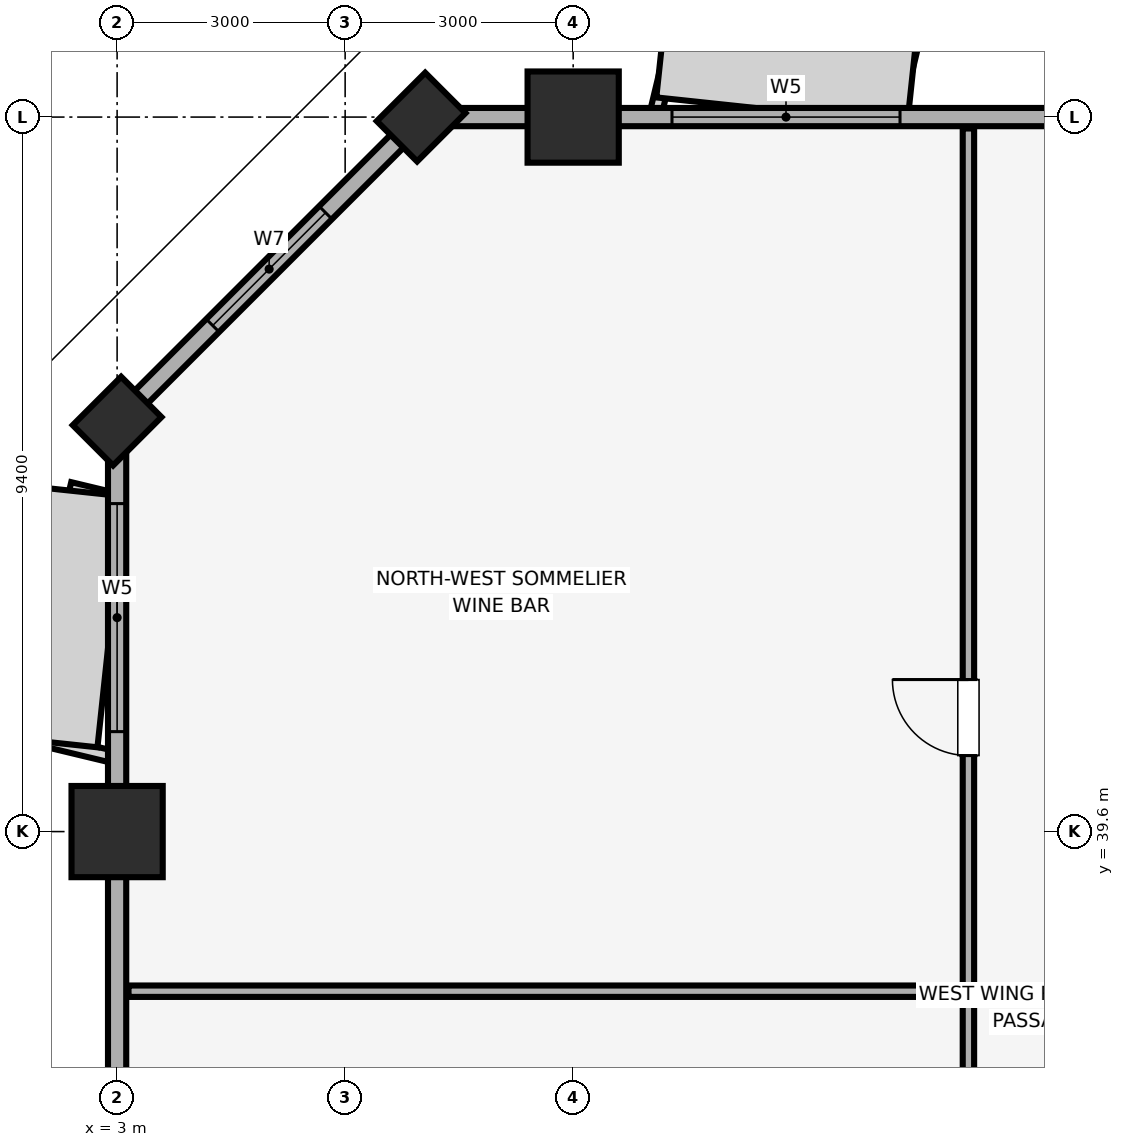
"""IFC4 building model, lengths in metres.
Left out: names, types, materials, properties, quantities, classifications, styles, units other than length and angle.
Written with IfcOpenShell. Run it as: python <this file> out.ifc"""

import sys

from ifc_helpers import new_model, si_unit, direction, frame, frame_2d, origin, origin_2d, place, context, subcontext, project, spatial, rectangle, extrude, element, fill, save


model = new_model("IFC4")
c1 = context("Model", 3, precision=1e-05, world=origin(), true_north=direction((0.0, 1.0)))
c2 = subcontext(c1, "Body", "Model", "MODEL_VIEW")
j1 = project(units=[si_unit("LENGTHUNIT", "METRE"), si_unit("PLANEANGLEUNIT", "RADIAN")], contexts=[c1])
p1 = place(None, origin())
s1 = spatial("IfcSite", under=j1, at=p1, CompositionType="ELEMENT")
p2 = place(p1, origin())
s2 = spatial("IfcBuilding", under=s1, at=p2, CompositionType="ELEMENT")
p3 = place(p2, frame((0.0, 0.0, 180.95)))
s3 = spatial("IfcBuildingStorey", under=s2, at=p3, CompositionType="ELEMENT", Elevation=180.95)
p4 = place(p3, frame((3.0, 39.6, 0.0), z_axis=(0.0, 0.0, 1.0), x_axis=(1.0, 0.0, 0.0)))
e1 = element("IfcColumn", 1, at=p4, inside=s3, PredefinedType="COLUMN", context=c2, shape_type="SweptSolid", body=[
    extrude(rectangle(XDim=1.2, YDim=1.2, at=origin_2d()), origin(), (0.0, 0.0, 1.0), 3.45),
])
for number, where, z_axis, x_axis in (
    (2, (7.0, 49.0, 0.0), (0.0, 0.0, 1.0), (0.707, 0.707, 0.0)),
    (3, (3.0, 45.0, 0.0), (0.0, 0.0, 1.0), (0.707, 0.707, 0.0)),
):
    element("IfcColumn", number, at=place(p3, frame(where, z_axis=z_axis, x_axis=x_axis)), inside=s3, PredefinedType="PILASTER", context=c2, shape_type="SweptSolid", body=[
        extrude(rectangle(XDim=0.9, YDim=0.75, at=origin_2d()), origin(), (0.0, 0.0, 1.0), 3.45),
    ])
p5 = place(p3, frame((9.0, 49.0, 0.0), z_axis=(0.0, 0.0, 1.0), x_axis=(1.0, 0.0, 0.0)))
e4 = element("IfcColumn", 4, at=p5, inside=s3, PredefinedType="COLUMN", context=c2, shape_type="SweptSolid", body=[
    extrude(rectangle(XDim=1.2, YDim=1.2, at=origin_2d()), origin(), (0.0, 0.0, 1.0), 3.45),
])
p6 = place(p3, frame((77.0, 49.0, 0.0), z_axis=(0.0, 0.0, 1.0), x_axis=(-1.0, 0.0, 0.0)))
e5 = element("IfcWall", 5, at=p6, inside=s3, PredefinedType="SOLIDWALL", context=c2, shape_type="SweptSolid", body=[
    extrude(rectangle(XDim=70.0, YDim=0.24, at=frame_2d((35.0, 0.0))), origin(), (0.0, 0.0, 1.0), 2.65),
])
p7 = place(p6, frame((63.7, 0.0, 0.85)))
e6 = element("IfcOpeningElement", 6, at=p7, cuts=e5, PredefinedType="OPENING", context=c2, shape_type="SweptSolid", body=[
    extrude(rectangle(XDim=3.0, YDim=1.5, at=frame_2d((1.5, 0.75))), frame((0.0, 0.13, 0.0), z_axis=(0.0, -1.0, 0.0), x_axis=(1.0, 0.0, 0.0)), (0.0, 0.0, 1.0), 0.26),
])
p8 = place(p6, frame((3.3, 0.0, 0.85)))
e7 = element("IfcOpeningElement", 7, at=p8, cuts=e5, PredefinedType="OPENING", context=c2, shape_type="SweptSolid", body=[
    extrude(rectangle(XDim=3.0, YDim=1.5, at=frame_2d((1.5, 0.75))), frame((0.0, 0.13, 0.0), z_axis=(0.0, -1.0, 0.0), x_axis=(1.0, 0.0, 0.0)), (0.0, 0.0, 1.0), 0.26),
])
p9 = place(p6, frame((49.465, 0.0, 0.9)))
e8 = element("IfcOpeningElement", 8, at=p9, cuts=e5, PredefinedType="OPENING", context=c2, shape_type="SweptSolid", body=[
    extrude(rectangle(XDim=1.5, YDim=1.4, at=frame_2d((0.75, 0.7))), frame((0.0, 0.13, 0.0), z_axis=(0.0, -1.0, 0.0), x_axis=(1.0, 0.0, 0.0)), (0.0, 0.0, 1.0), 0.26),
])
p10 = place(p6, frame((41.65, 0.0, 0.9)))
e9 = element("IfcOpeningElement", 9, at=p10, cuts=e5, PredefinedType="OPENING", context=c2, shape_type="SweptSolid", body=[
    extrude(rectangle(XDim=3.6, YDim=1.5, at=frame_2d((1.8, 0.75))), frame((0.0, 0.13, 0.0), z_axis=(0.0, -1.0, 0.0), x_axis=(1.0, 0.0, 0.0)), (0.0, 0.0, 1.0), 0.26),
])
p11 = place(p6, frame((28.25, 0.0, 0.9)))
e10 = element("IfcOpeningElement", 10, at=p11, cuts=e5, PredefinedType="OPENING", context=c2, shape_type="SweptSolid", body=[
    extrude(rectangle(XDim=1.5, YDim=1.4, at=frame_2d((0.75, 0.7))), frame((0.0, 0.13, 0.0), z_axis=(0.0, -1.0, 0.0), x_axis=(1.0, 0.0, 0.0)), (0.0, 0.0, 1.0), 0.26),
])
p12 = place(p6, frame((24.6, 0.0, 0.9)))
e11 = element("IfcOpeningElement", 11, at=p12, cuts=e5, PredefinedType="OPENING", context=c2, shape_type="SweptSolid", body=[
    extrude(rectangle(XDim=2.4, YDim=1.5, at=frame_2d((1.2, 0.75))), frame((0.0, 0.13, 0.0), z_axis=(0.0, -1.0, 0.0), x_axis=(1.0, 0.0, 0.0)), (0.0, 0.0, 1.0), 0.26),
])
p13 = place(p6, frame((20.235, 0.0, 0.9)))
e12 = element("IfcOpeningElement", 12, at=p13, cuts=e5, PredefinedType="OPENING", context=c2, shape_type="SweptSolid", body=[
    extrude(rectangle(XDim=2.4, YDim=1.5, at=frame_2d((1.2, 0.75))), frame((0.0, 0.13, 0.0), z_axis=(0.0, -1.0, 0.0), x_axis=(1.0, 0.0, 0.0)), (0.0, 0.0, 1.0), 0.26),
])
p14 = place(p3, frame((7.0, 49.0, 0.0), z_axis=(0.0, 0.0, 1.0), x_axis=(-0.707106781187, -0.707106781187, 0.0)))
e13 = element("IfcWall", 13, at=p14, inside=s3, PredefinedType="SOLIDWALL", context=c2, shape_type="SweptSolid", body=[
    extrude(rectangle(XDim=5.657, YDim=0.24, at=frame_2d((2.828, 0.0))), origin(), (0.0, 0.0, 1.0), 2.65),
])
p15 = place(p14, frame((1.778, 0.0, 0.85)))
e14 = element("IfcOpeningElement", 14, at=p15, cuts=e13, PredefinedType="OPENING", context=c2, shape_type="SweptSolid", body=[
    extrude(rectangle(XDim=2.1, YDim=1.6, at=frame_2d((1.05, 0.8))), frame((0.0, 0.13, 0.0), z_axis=(0.0, -1.0, 0.0), x_axis=(1.0, 0.0, 0.0)), (0.0, 0.0, 1.0), 0.26),
])
p16 = place(p3, frame((3.0, 45.0, 0.0), z_axis=(0.0, 0.0, 1.0), x_axis=(0.0, -1.0, 0.0)))
e15 = element("IfcWall", 15, at=p16, inside=s3, PredefinedType="SOLIDWALL", context=c2, shape_type="SweptSolid", body=[
    extrude(rectangle(XDim=38.0, YDim=0.24, at=frame_2d((19.0, 0.0))), origin(), (0.0, 0.0, 1.0), 2.65),
])
p17 = place(p16, frame((32.5, 0.0, 0.85)))
e16 = element("IfcOpeningElement", 16, at=p17, cuts=e15, PredefinedType="OPENING", context=c2, shape_type="SweptSolid", body=[
    extrude(rectangle(XDim=3.0, YDim=1.5, at=frame_2d((1.5, 0.75))), frame((0.0, 0.13, 0.0), z_axis=(0.0, -1.0, 0.0), x_axis=(1.0, 0.0, 0.0)), (0.0, 0.0, 1.0), 0.26),
])
p18 = place(p16, frame((24.55, 0.0, 0.85)))
e17 = element("IfcOpeningElement", 17, at=p18, cuts=e15, PredefinedType="OPENING", context=c2, shape_type="SweptSolid", body=[
    extrude(rectangle(XDim=3.0, YDim=1.5, at=frame_2d((1.5, 0.75))), frame((0.0, 0.13, 0.0), z_axis=(0.0, -1.0, 0.0), x_axis=(1.0, 0.0, 0.0)), (0.0, 0.0, 1.0), 0.26),
])
p19 = place(p16, frame((17.75, 0.0, 0.85)))
e18 = element("IfcOpeningElement", 18, at=p19, cuts=e15, PredefinedType="OPENING", context=c2, shape_type="SweptSolid", body=[
    extrude(rectangle(XDim=3.0, YDim=1.5, at=frame_2d((1.5, 0.75))), frame((0.0, 0.13, 0.0), z_axis=(0.0, -1.0, 0.0), x_axis=(1.0, 0.0, 0.0)), (0.0, 0.0, 1.0), 0.26),
])
p20 = place(p16, frame((9.85, 0.0, 0.85)))
e19 = element("IfcOpeningElement", 19, at=p20, cuts=e15, PredefinedType="OPENING", context=c2, shape_type="SweptSolid", body=[
    extrude(rectangle(XDim=3.0, YDim=1.5, at=frame_2d((1.5, 0.75))), frame((0.0, 0.13, 0.0), z_axis=(0.0, -1.0, 0.0), x_axis=(1.0, 0.0, 0.0)), (0.0, 0.0, 1.0), 0.26),
])
p21 = place(p16, frame((1.085, 0.0, 0.85)))
e20 = element("IfcOpeningElement", 20, at=p21, cuts=e15, PredefinedType="OPENING", context=c2, shape_type="SweptSolid", body=[
    extrude(rectangle(XDim=3.0, YDim=1.5, at=frame_2d((1.5, 0.75))), frame((0.0, 0.13, 0.0), z_axis=(0.0, -1.0, 0.0), x_axis=(1.0, 0.0, 0.0)), (0.0, 0.0, 1.0), 0.26),
])
p22 = place(p3, frame((3.15, 37.5, 0.0), z_axis=(0.0, 0.0, 1.0), x_axis=(1.0, 0.0, 0.0)))
e21 = element("IfcWall", 21, at=p22, inside=s3, PredefinedType="PARTITIONING", context=c2, shape_type="SweptSolid", body=[
    extrude(rectangle(XDim=11.05, YDim=0.15, at=frame_2d((5.525, 0.0))), origin(), (0.0, 0.0, 1.0), 3.45),
])
p23 = place(p3, frame((14.2, 29.495, 0.0), z_axis=(0.0, 0.0, 1.0), x_axis=(0.0, 1.0, 0.0)))
e22 = element("IfcWall", 22, at=p23, inside=s3, PredefinedType="PARTITIONING", context=c2, shape_type="SweptSolid", body=[
    extrude(rectangle(XDim=7.925, YDim=0.15, at=frame_2d((3.962, 0.0))), origin(), (0.0, 0.0, 1.0), 3.45),
])
p24 = place(p23, frame((3.455, 0.0, 0.0)))
e23 = element("IfcOpeningElement", 23, at=p24, cuts=e22, PredefinedType="OPENING", context=c2, shape_type="SweptSolid", body=[
    extrude(rectangle(XDim=1.0, YDim=2.15, at=frame_2d((0.5, 1.075))), frame((0.0, 0.085, 0.0), z_axis=(0.0, -1.0, 0.0), x_axis=(1.0, 0.0, 0.0)), (0.0, 0.0, 1.0), 0.17),
])
p25 = place(p3, frame((14.2, 37.58, 0.0), z_axis=(0.0, 0.0, 1.0), x_axis=(0.0, 1.0, 0.0)))
e24 = element("IfcWall", 24, at=p25, inside=s3, PredefinedType="PARTITIONING", context=c2, shape_type="SweptSolid", body=[
    extrude(rectangle(XDim=11.27, YDim=0.15, at=frame_2d((5.635, 0.0))), origin(), (0.0, 0.0, 1.0), 3.45),
])
p26 = place(p25, frame((3.02, 0.0, 0.0)))
e25 = element("IfcOpeningElement", 25, at=p26, cuts=e24, PredefinedType="OPENING", context=c2, shape_type="SweptSolid", body=[
    extrude(rectangle(XDim=1.0, YDim=2.15, at=frame_2d((0.5, 1.075))), frame((0.0, 0.085, 0.0), z_axis=(0.0, -1.0, 0.0), x_axis=(1.0, 0.0, 0.0)), (0.0, 0.0, 1.0), 0.17),
])
p27 = place(p15, origin())
e26 = element("IfcWindow", 26, at=p27, inside=s3, PartitioningType="SINGLE_PANEL", PredefinedType="WINDOW", context=c2, shape_type="SweptSolid", body=[
    extrude(rectangle(XDim=2.1, YDim=1.6, at=frame_2d((1.05, 0.8))), frame((0.0, 0.03, 0.0), z_axis=(0.0, -1.0, 0.0), x_axis=(1.0, 0.0, 0.0)), (0.0, 0.0, 1.0), 0.06),
])
fill(e14, e26)
p28 = place(p21, origin())
e27 = element("IfcWindow", 27, at=p28, inside=s3, PartitioningType="SINGLE_PANEL", PredefinedType="WINDOW", context=c2, shape_type="SweptSolid", body=[
    extrude(rectangle(XDim=3.0, YDim=1.5, at=frame_2d((1.5, 0.75))), frame((0.0, 0.03, 0.0), z_axis=(0.0, -1.0, 0.0), x_axis=(1.0, 0.0, 0.0)), (0.0, 0.0, 1.0), 0.06),
])
fill(e20, e27)
p29 = place(p7, origin())
e28 = element("IfcWindow", 28, at=p29, inside=s3, PartitioningType="SINGLE_PANEL", PredefinedType="WINDOW", context=c2, shape_type="SweptSolid", body=[
    extrude(rectangle(XDim=3.0, YDim=1.5, at=frame_2d((1.5, 0.75))), frame((0.0, 0.03, 0.0), z_axis=(0.0, -1.0, 0.0), x_axis=(1.0, 0.0, 0.0)), (0.0, 0.0, 1.0), 0.06),
])
fill(e6, e28)
p30 = place(p26, origin())
e29 = element("IfcDoor", 29, at=p30, inside=s3, OperationType="SINGLE_SWING_RIGHT", PredefinedType="DOOR", context=c2, shape_type="SweptSolid", body=[
    extrude(rectangle(XDim=1.0, YDim=2.15, at=frame_2d((0.5, 1.075))), frame((0.0, 0.025, 0.0), z_axis=(0.0, -1.0, 0.0), x_axis=(1.0, 0.0, 0.0)), (0.0, 0.0, 1.0), 0.05),
])
fill(e25, e29)
save(model, sys.argv[1])
